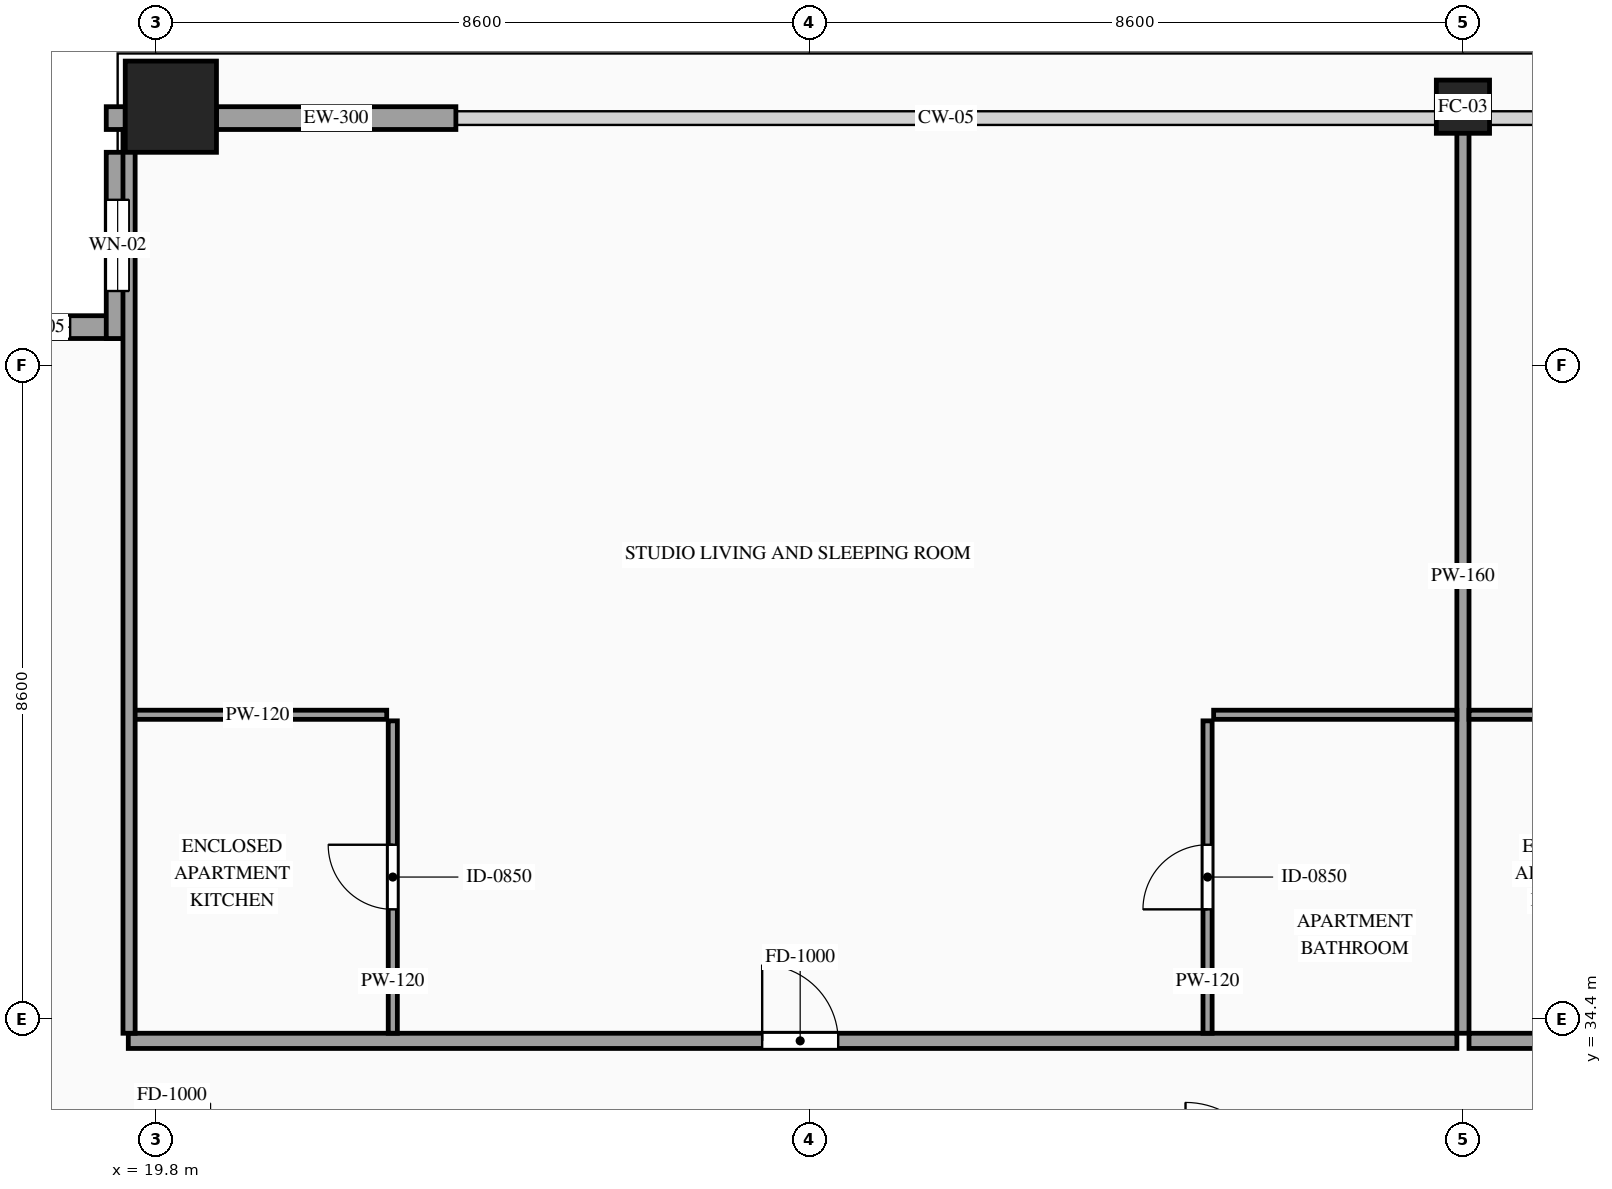
"""IFC4 building model, lengths in metres.
Left out: names, types, materials, properties, quantities, classifications, styles, units other than length and angle.
Written with IfcOpenShell. Run it as: python <this file> out.ifc"""

import sys

from ifc_helpers import new_model, si_unit, direction, frame, frame_2d, origin, origin_2d, place, context, subcontext, project, spatial, rectangle, hollow_rectangle, extrude, source, transform, mapped, element, fill, save


model = new_model("IFC4")
c1 = context("Model", 3, precision=1e-05, world=origin(), true_north=direction((0.0, 1.0)))
c2 = subcontext(c1, "Body", "Model", "MODEL_VIEW")
j1 = project(units=[si_unit("LENGTHUNIT", "METRE"), si_unit("PLANEANGLEUNIT", "RADIAN")], contexts=[c1])
p1 = place(None, origin())
s1 = spatial("IfcSite", under=j1, at=p1, CompositionType="ELEMENT")
p2 = place(p1, origin())
s2 = spatial("IfcBuilding", under=s1, at=p2, CompositionType="ELEMENT")
p3 = place(p2, frame((0.0, 0.0, 227.6)))
s3 = spatial("IfcBuildingStorey", under=s2, at=p3, CompositionType="ELEMENT", Elevation=227.6)
m1 = source(origin(), c2, "Body", "SweptSolid", [
    extrude(hollow_rectangle(XDim=1.2, YDim=1.2, WallThickness=0.055, at=origin_2d()), origin(), (0.0, 0.0, 1.0), 3.5),
])
p4 = place(p3, frame((20.0, 46.4, 0.0), z_axis=(0.0, 0.0, 1.0), x_axis=(1.0, 0.0, 0.0)))
e1 = element("IfcColumn", 1, at=p4, inside=s3, PredefinedType="COLUMN", context=c2, shape_type="MappedRepresentation", body=[
    mapped(m1, transform((0.0, 0.0, 0.0), scale=1.0)),
])
m2 = source(origin(), c2, "Body", "SweptSolid", [
    extrude(hollow_rectangle(XDim=0.7, YDim=0.7, WallThickness=0.032, at=origin_2d()), origin(), (0.0, 0.0, 1.0), 3.5),
])
p5 = place(p3, frame((37.0, 46.4, 0.0), z_axis=(0.0, 0.0, 1.0), x_axis=(1.0, 0.0, 0.0)))
e2 = element("IfcColumn", 2, at=p5, inside=s3, PredefinedType="COLUMN", context=c2, shape_type="MappedRepresentation", body=[
    mapped(m2, transform((0.0, 0.0, 0.0), scale=1.0)),
])
p6 = place(p3, frame((19.45, 43.5, 0.0), z_axis=(0.0, 0.0, 1.0), x_axis=(-1.0, 0.0, 0.0)))
e3 = element("IfcWall", 3, at=p6, inside=s3, PredefinedType="SOLIDWALL", context=c2, shape_type="SweptSolid", body=[
    extrude(rectangle(XDim=2.45, YDim=0.3, at=frame_2d((1.225, 0.0))), origin(), (0.0, 0.0, 1.0), 3.28),
])
p7 = place(p6, frame((0.775, 0.0, 0.85)))
e4 = element("IfcOpeningElement", 4, at=p7, cuts=e3, PredefinedType="OPENING", context=c2, shape_type="SweptSolid", body=[
    extrude(rectangle(XDim=0.9, YDim=1.5, at=frame_2d((0.45, 0.75))), frame((0.0, 0.165, 0.0), z_axis=(0.0, -1.0, 0.0), x_axis=(1.0, 0.0, 0.0)), (0.0, 0.0, 1.0), 0.33),
])
p8 = place(p3, frame((19.3, 45.8, 0.0), z_axis=(0.0, 0.0, 1.0), x_axis=(0.0, -1.0, 0.0)))
e5 = element("IfcWall", 5, at=p8, inside=s3, PredefinedType="SOLIDWALL", context=c2, shape_type="SweptSolid", body=[
    extrude(rectangle(XDim=2.45, YDim=0.3, at=frame_2d((1.225, 0.0))), origin(), (0.0, 0.0, 1.0), 3.28),
])
p9 = place(p8, frame((0.625, 0.0, 0.85)))
e6 = element("IfcOpeningElement", 6, at=p9, cuts=e5, PredefinedType="OPENING", context=c2, shape_type="SweptSolid", body=[
    extrude(rectangle(XDim=1.2, YDim=2.1, at=frame_2d((0.6, 1.05))), frame((0.0, 0.165, 0.0), z_axis=(0.0, -1.0, 0.0), x_axis=(1.0, 0.0, 0.0)), (0.0, 0.0, 1.0), 0.33),
])
m3 = source(origin(), c2, "Body", "SweptSolid", [
    extrude(rectangle(XDim=0.25, YDim=0.3, at=frame_2d((0.125, 0.0))), origin(), (0.0, 0.0, 1.0), 3.28),
])
p10 = place(p3, frame((19.15, 46.25, 0.0), z_axis=(0.0, 0.0, 1.0), x_axis=(1.0, 0.0, 0.0)))
e7 = element("IfcWall", 7, at=p10, inside=s3, PredefinedType="SOLIDWALL", context=c2, shape_type="MappedRepresentation", body=[
    mapped(m3, transform((0.0, 0.0, 0.0), scale=1.0)),
])
m4 = source(origin(), c2, "Body", "SweptSolid", [
    extrude(rectangle(XDim=3.15, YDim=0.3, at=frame_2d((1.575, 0.0))), origin(), (0.0, 0.0, 1.0), 2.835),
])
p11 = place(p3, frame((20.6, 46.25, 0.0), z_axis=(0.0, 0.0, 1.0), x_axis=(1.0, 0.0, 0.0)))
e8 = element("IfcWall", 8, at=p11, inside=s3, PredefinedType="SOLIDWALL", context=c2, shape_type="MappedRepresentation", body=[
    mapped(m4, transform((0.0, 0.0, 0.0), scale=1.0)),
])
p12 = place(p3, frame((19.44, 34.11, 0.0), z_axis=(0.0, 0.0, 1.0), x_axis=(1.0, 0.0, 0.0)))
e9 = element("IfcWall", 9, at=p12, inside=s3, PredefinedType="PARTITIONING", context=c2, shape_type="SweptSolid", body=[
    extrude(rectangle(XDim=17.48, YDim=0.2, at=frame_2d((8.74, 0.0))), origin(), (0.0, 0.0, 1.0), 3.28),
])
p13 = place(p12, frame((8.34, 0.0, 0.0)))
e10 = element("IfcOpeningElement", 10, at=p13, cuts=e9, PredefinedType="OPENING", context=c2, shape_type="SweptSolid", body=[
    extrude(rectangle(XDim=1.0, YDim=2.2, at=frame_2d((0.5, 1.1))), frame((0.0, 0.115, 0.0), z_axis=(0.0, -1.0, 0.0), x_axis=(1.0, 0.0, 0.0)), (0.0, 0.0, 1.0), 0.23),
])
m5 = source(origin(), c2, "Body", "SweptSolid", [
    extrude(rectangle(XDim=12.04, YDim=0.16, at=frame_2d((6.02, 0.0))), origin(), (0.0, 0.0, 1.0), 2.787),
])
p14 = place(p3, frame((37.0, 34.21, 0.0), z_axis=(0.0, 0.0, 1.0), x_axis=(0.0, 1.0, 0.0)))
e11 = element("IfcWall", 11, at=p14, inside=s3, PredefinedType="PARTITIONING", context=c2, shape_type="MappedRepresentation", body=[
    mapped(m5, transform((0.0, 0.0, 0.0), scale=1.0)),
])
m6 = source(origin(), c2, "Body", "SweptSolid", [
    extrude(rectangle(XDim=3.4, YDim=0.12, at=frame_2d((1.7, 0.0))), origin(), (0.0, 0.0, 1.0), 3.28),
])
p15 = place(p3, frame((19.44, 38.4, 0.0), z_axis=(0.0, 0.0, 1.0), x_axis=(1.0, 0.0, 0.0)))
e12 = element("IfcWall", 12, at=p15, inside=s3, PredefinedType="PARTITIONING", context=c2, shape_type="MappedRepresentation", body=[
    mapped(m6, transform((0.0, 0.0, 0.0), scale=1.0)),
])
p16 = place(p3, frame((22.92, 34.21, 0.0), z_axis=(0.0, 0.0, 1.0), x_axis=(0.0, 1.0, 0.0)))
e13 = element("IfcWall", 13, at=p16, inside=s3, PredefinedType="PARTITIONING", context=c2, shape_type="SweptSolid", body=[
    extrude(rectangle(XDim=4.11, YDim=0.12, at=frame_2d((2.055, 0.0))), origin(), (0.0, 0.0, 1.0), 3.28),
])
p17 = place(p16, frame((1.63, 0.0, 0.0)))
e14 = element("IfcOpeningElement", 14, at=p17, cuts=e13, PredefinedType="OPENING", context=c2, shape_type="SweptSolid", body=[
    extrude(rectangle(XDim=0.85, YDim=2.1, at=frame_2d((0.425, 1.05))), frame((0.0, 0.075, 0.0), z_axis=(0.0, -1.0, 0.0), x_axis=(1.0, 0.0, 0.0)), (0.0, 0.0, 1.0), 0.15),
])
m7 = source(origin(), c2, "Body", "SweptSolid", [
    extrude(rectangle(XDim=3.2, YDim=0.12, at=frame_2d((1.6, 0.0))), origin(), (0.0, 0.0, 1.0), 3.28),
])
p18 = place(p3, frame((33.72, 38.4, 0.0), z_axis=(0.0, 0.0, 1.0), x_axis=(1.0, 0.0, 0.0)))
e15 = element("IfcWall", 15, at=p18, inside=s3, PredefinedType="PARTITIONING", context=c2, shape_type="MappedRepresentation", body=[
    mapped(m7, transform((0.0, 0.0, 0.0), scale=1.0)),
])
p19 = place(p3, frame((33.64, 34.21, 0.0), z_axis=(0.0, 0.0, 1.0), x_axis=(0.0, 1.0, 0.0)))
e16 = element("IfcWall", 16, at=p19, inside=s3, PredefinedType="PARTITIONING", context=c2, shape_type="SweptSolid", body=[
    extrude(rectangle(XDim=4.11, YDim=0.12, at=frame_2d((2.055, 0.0))), origin(), (0.0, 0.0, 1.0), 3.28),
])
p20 = place(p19, frame((1.63, 0.0, 0.0)))
e17 = element("IfcOpeningElement", 17, at=p20, cuts=e16, PredefinedType="OPENING", context=c2, shape_type="SweptSolid", body=[
    extrude(rectangle(XDim=0.85, YDim=2.1, at=frame_2d((0.425, 1.05))), frame((0.0, 0.075, 0.0), z_axis=(0.0, -1.0, 0.0), x_axis=(1.0, 0.0, 0.0)), (0.0, 0.0, 1.0), 0.15),
])
p21 = place(p3, frame((37.08, 34.11, 0.0), z_axis=(0.0, 0.0, 1.0), x_axis=(1.0, 0.0, 0.0)))
e18 = element("IfcWall", 18, at=p21, inside=s3, PredefinedType="PARTITIONING", context=c2, shape_type="SweptSolid", body=[
    extrude(rectangle(XDim=17.48, YDim=0.2, at=frame_2d((8.74, 0.0))), origin(), (0.0, 0.0, 1.0), 3.28),
])
p22 = place(p21, frame((8.34, 0.0, 0.0)))
e19 = element("IfcOpeningElement", 19, at=p22, cuts=e18, PredefinedType="OPENING", context=c2, shape_type="SweptSolid", body=[
    extrude(rectangle(XDim=1.0, YDim=2.2, at=frame_2d((0.5, 1.1))), frame((0.0, 0.115, 0.0), z_axis=(0.0, -1.0, 0.0), x_axis=(1.0, 0.0, 0.0)), (0.0, 0.0, 1.0), 0.23),
])
m8 = source(origin(), c2, "Body", "SweptSolid", [
    extrude(rectangle(XDim=11.89, YDim=0.16, at=frame_2d((5.945, 0.0))), origin(), (0.0, 0.0, 1.0), 3.28),
])
p23 = place(p3, frame((19.45, 34.21, 0.0), z_axis=(0.0, 0.0, 1.0), x_axis=(0.0, 1.0, 0.0)))
e20 = element("IfcWall", 20, at=p23, inside=s3, PredefinedType="PARTITIONING", context=c2, shape_type="MappedRepresentation", body=[
    mapped(m8, transform((0.0, 0.0, 0.0), scale=1.0)),
])
m9 = source(origin(), c2, "Body", "SweptSolid", [
    extrude(rectangle(XDim=3.4, YDim=0.12, at=frame_2d((1.7, 0.0))), origin(), (0.0, 0.0, 1.0), 3.28),
])
p24 = place(p3, frame((37.08, 38.4, 0.0), z_axis=(0.0, 0.0, 1.0), x_axis=(1.0, 0.0, 0.0)))
e21 = element("IfcWall", 21, at=p24, inside=s3, PredefinedType="PARTITIONING", context=c2, shape_type="MappedRepresentation", body=[
    mapped(m9, transform((0.0, 0.0, 0.0), scale=1.0)),
])
m10 = source(origin(), c2, "Body", "SweptSolid", [
    extrude(rectangle(XDim=0.9, YDim=1.5, at=frame_2d((0.45, 0.75))), frame((0.0, 0.03, 0.0), z_axis=(0.0, -1.0, 0.0), x_axis=(1.0, 0.0, 0.0)), (0.0, 0.0, 1.0), 0.06),
])
p25 = place(p7, origin())
e22 = element("IfcWindow", 22, at=p25, inside=s3, PartitioningType="SINGLE_PANEL", PredefinedType="WINDOW", context=c2, shape_type="MappedRepresentation", body=[
    mapped(m10, transform((0.0, 0.0, 0.0), scale=1.0)),
])
fill(e4, e22)
m11 = source(origin(), c2, "Body", "SweptSolid", [
    extrude(rectangle(XDim=1.2, YDim=2.1, at=frame_2d((0.6, 1.05))), frame((0.0, 0.03, 0.0), z_axis=(0.0, -1.0, 0.0), x_axis=(1.0, 0.0, 0.0)), (0.0, 0.0, 1.0), 0.06),
])
p26 = place(p9, origin())
e23 = element("IfcWindow", 23, at=p26, inside=s3, PartitioningType="SINGLE_PANEL", PredefinedType="WINDOW", context=c2, shape_type="MappedRepresentation", body=[
    mapped(m11, transform((0.0, 0.0, 0.0), scale=1.0)),
])
fill(e6, e23)
m12 = source(origin(), c2, "Body", "SweptSolid", [
    extrude(rectangle(XDim=1.0, YDim=2.2, at=frame_2d((0.5, 1.1))), frame((0.0, 0.025, 0.0), z_axis=(0.0, -1.0, 0.0), x_axis=(1.0, 0.0, 0.0)), (0.0, 0.0, 1.0), 0.05),
])
p27 = place(p13, origin())
e24 = element("IfcDoor", 24, at=p27, inside=s3, OperationType="SINGLE_SWING_LEFT", PredefinedType="DOOR", context=c2, shape_type="MappedRepresentation", body=[
    mapped(m12, transform((0.0, 0.0, 0.0), scale=1.0)),
])
fill(e10, e24)
m13 = source(origin(), c2, "Body", "SweptSolid", [
    extrude(rectangle(XDim=0.85, YDim=2.1, at=frame_2d((0.425, 1.05))), frame((0.0, 0.025, 0.0), z_axis=(0.0, -1.0, 0.0), x_axis=(1.0, 0.0, 0.0)), (0.0, 0.0, 1.0), 0.05),
])
p28 = place(p17, origin())
e25 = element("IfcDoor", 25, at=p28, inside=s3, OperationType="SINGLE_SWING_RIGHT", PredefinedType="DOOR", context=c2, shape_type="MappedRepresentation", body=[
    mapped(m13, transform((0.0, 0.0, 0.0), scale=1.0)),
])
fill(e14, e25)
p29 = place(p20, origin())
e26 = element("IfcDoor", 26, at=p29, inside=s3, OperationType="SINGLE_SWING_LEFT", PredefinedType="DOOR", context=c2, shape_type="MappedRepresentation", body=[
    mapped(m13, transform((0.0, 0.0, 0.0), scale=1.0)),
])
fill(e17, e26)
save(model, sys.argv[1])
